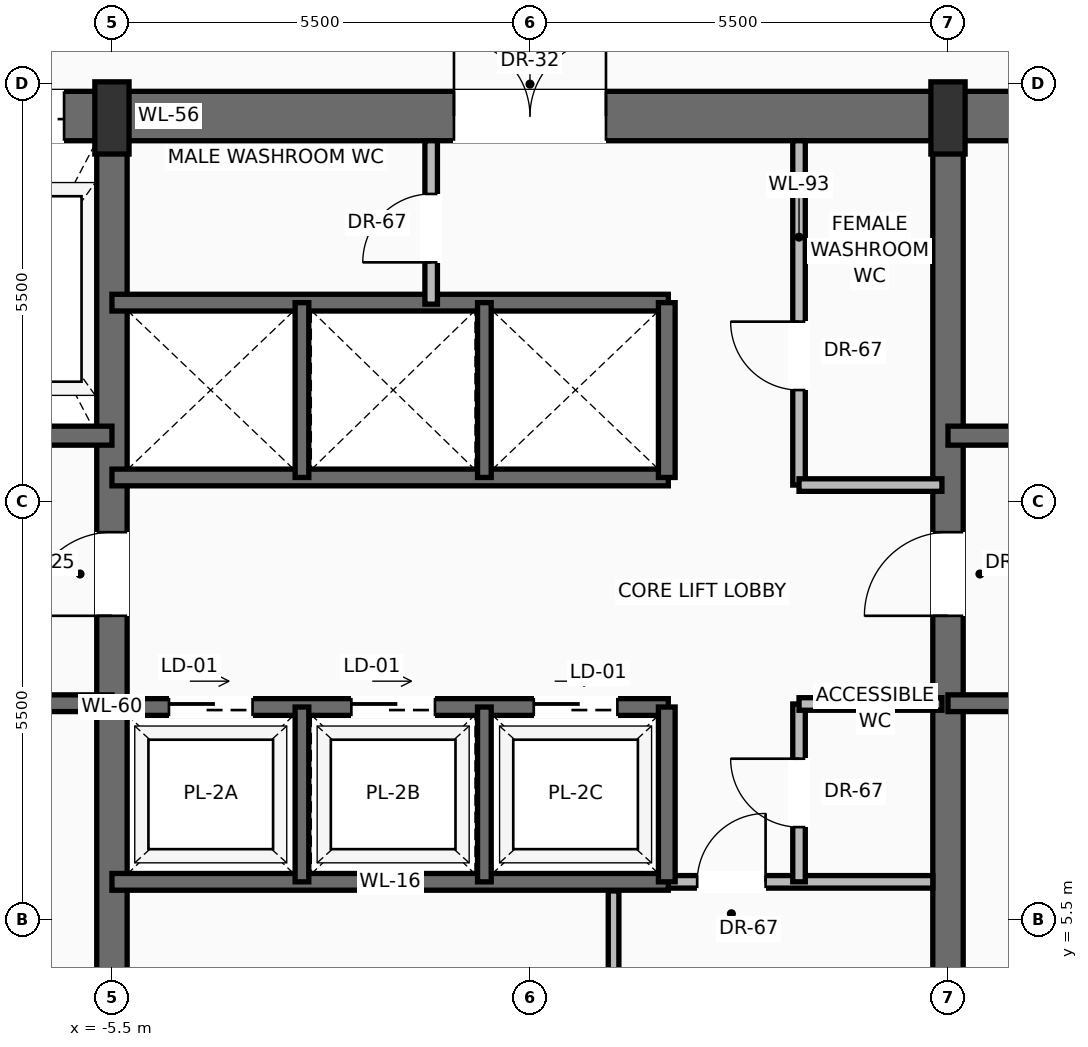
"""IFC4 building model, lengths in metres.
Left out: names, types, materials, properties, quantities, classifications, styles, units other than length and angle.
Written with IfcOpenShell. Run it as: python <this file> out.ifc"""

import sys

from ifc_helpers import new_model, si_unit, direction, frame, frame_2d, origin, origin_2d, place, context, subcontext, project, spatial, rectangle, extrude, source, transform, mapped, element, fill, save


model = new_model("IFC4")
c1 = context("Model", 3, precision=1e-05, world=origin(), true_north=direction((0.0, 1.0)))
c2 = subcontext(c1, "Body", "Model", "MODEL_VIEW")
j1 = project(units=[si_unit("LENGTHUNIT", "METRE"), si_unit("PLANEANGLEUNIT", "RADIAN")], contexts=[c1])
p1 = place(None, origin())
s1 = spatial("IfcSite", under=j1, at=p1, CompositionType="ELEMENT")
p2 = place(p1, origin())
s2 = spatial("IfcBuilding", under=s1, at=p2, CompositionType="ELEMENT")
p3 = place(p2, frame((0.0, 0.0, 193.2)))
s3 = spatial("IfcBuildingStorey", under=s2, at=p3, CompositionType="ELEMENT", Elevation=193.2)
p4 = place(p3, frame((-10.8, 16.075, 0.0), z_axis=(0.0, 0.0, 1.0), x_axis=(1.0, 0.0, 0.0)))
e1 = element("IfcWall", 1, at=p4, inside=s3, PredefinedType="SHEAR", context=c2, shape_type="SweptSolid", body=[
    extrude(rectangle(XDim=21.6, YDim=0.65, at=frame_2d((10.8, 0.0))), origin(), (0.0, 0.0, 1.0), 3.47),
])
p5 = place(p4, frame((3.37, 0.0, 0.0)))
e2 = element("IfcOpeningElement", 2, at=p5, cuts=e1, PredefinedType="OPENING", context=c2, shape_type="SweptSolid", body=[
    extrude(rectangle(XDim=1.3, YDim=2.3, at=frame_2d((0.65, 1.15))), frame((0.0, 0.335, 0.0), z_axis=(0.0, -1.0, 0.0), x_axis=(1.0, 0.0, 0.0)), (0.0, 0.0, 1.0), 0.67),
])
p6 = place(p4, frame((9.8, 0.0, 0.0)))
e3 = element("IfcOpeningElement", 3, at=p6, cuts=e1, PredefinedType="OPENING", context=c2, shape_type="SweptSolid", body=[
    extrude(rectangle(XDim=2.0, YDim=2.4, at=frame_2d((1.0, 1.2))), frame((0.0, 0.335, 0.0), z_axis=(0.0, -1.0, 0.0), x_axis=(1.0, 0.0, 0.0)), (0.0, 0.0, 1.0), 0.67),
])
p7 = place(p3, frame((-5.5, 0.525, 0.0), z_axis=(0.0, 0.0, 1.0), x_axis=(0.0, 1.0, 0.0)))
e4 = element("IfcWall", 4, at=p7, inside=s3, PredefinedType="SHEAR", context=c2, shape_type="SweptSolid", body=[
    extrude(rectangle(XDim=15.55, YDim=0.4, at=frame_2d((7.775, 0.0))), origin(), (0.0, 0.0, 1.0), 3.47),
])
p8 = place(p7, frame((8.975, 0.0, 0.0)))
e5 = element("IfcOpeningElement", 5, at=p8, cuts=e4, PredefinedType="OPENING", context=c2, shape_type="SweptSolid", body=[
    extrude(rectangle(XDim=1.1, YDim=2.2, at=frame_2d((0.55, 1.1))), frame((0.0, 0.21, 0.0), z_axis=(0.0, -1.0, 0.0), x_axis=(1.0, 0.0, 0.0)), (0.0, 0.0, 1.0), 0.42),
])
p9 = place(p3, frame((5.5, 0.525, 0.0), z_axis=(0.0, 0.0, 1.0), x_axis=(0.0, 1.0, 0.0)))
e6 = element("IfcWall", 6, at=p9, inside=s3, PredefinedType="SHEAR", context=c2, shape_type="SweptSolid", body=[
    extrude(rectangle(XDim=15.55, YDim=0.4, at=frame_2d((7.775, 0.0))), origin(), (0.0, 0.0, 1.0), 3.47),
])
p10 = place(p9, frame((8.975, 0.0, 0.0)))
e7 = element("IfcOpeningElement", 7, at=p10, cuts=e6, PredefinedType="OPENING", context=c2, shape_type="SweptSolid", body=[
    extrude(rectangle(XDim=1.1, YDim=2.2, at=frame_2d((0.55, 1.1))), frame((0.0, 0.21, 0.0), z_axis=(0.0, -1.0, 0.0), x_axis=(1.0, 0.0, 0.0)), (0.0, 0.0, 1.0), 0.42),
])
m1 = source(origin(), c2, "Body", "SweptSolid", [
    extrude(rectangle(XDim=0.45, YDim=0.95, at=origin_2d()), origin(), (0.0, 0.0, 1.0), 3.7),
])
for number, where, z_axis, x_axis in (
    (8, (-5.5, 16.05, 0.0), (0.0, 0.0, 1.0), (1.0, 0.0, 0.0)),
    (9, (5.5, 16.05, 0.0), (0.0, 0.0, 1.0), (1.0, 0.0, 0.0)),
):
    element("IfcColumn", number, at=place(p3, frame(where, z_axis=z_axis, x_axis=x_axis)), inside=s3, PredefinedType="PILASTER", context=c2, shape_type="MappedRepresentation", body=[
        mapped(m1, transform((0.0, 0.0, 0.0), scale=1.0)),
    ])
p11 = place(p3, frame((-5.5, 8.35, 0.0), z_axis=(0.0, 0.0, 1.0), x_axis=(-1.0, 0.0, 0.0)))
e10 = element("IfcWall", 10, at=p11, inside=s3, PredefinedType="SOLIDWALL", context=c2, shape_type="SweptSolid", body=[
    extrude(rectangle(XDim=4.65, YDim=0.22, at=frame_2d((2.325, 0.0))), origin(), (0.0, 0.0, 1.0), 3.47),
])
p12 = place(p11, frame((2.5, 0.0, 0.0)))
e11 = element("IfcOpeningElement", 11, at=p12, cuts=e10, PredefinedType="OPENING", context=c2, shape_type="SweptSolid", body=[
    extrude(rectangle(XDim=1.15, YDim=2.2, at=frame_2d((0.575, 1.1))), frame((0.0, 0.12, 0.0), z_axis=(0.0, -1.0, 0.0), x_axis=(1.0, 0.0, 0.0)), (0.0, 0.0, 1.0), 0.24),
])
p13 = place(p3, frame((-5.5, 11.87, 0.0), z_axis=(0.0, 0.0, 1.0), x_axis=(-1.0, 0.0, 0.0)))
e12 = element("IfcWall", 12, at=p13, inside=s3, PredefinedType="SOLIDWALL", context=c2, shape_type="SweptSolid", body=[
    extrude(rectangle(XDim=4.65, YDim=0.25, at=frame_2d((2.325, 0.0))), origin(), (0.0, 0.0, 1.0), 3.47),
])
p14 = place(p13, frame((2.95, 0.0, 0.0)))
e13 = element("IfcOpeningElement", 13, at=p14, cuts=e12, PredefinedType="OPENING", context=c2, shape_type="SweptSolid", body=[
    extrude(rectangle(XDim=1.2, YDim=2.25, at=frame_2d((0.6, 1.125))), frame((0.0, 0.135, 0.0), z_axis=(0.0, -1.0, 0.0), x_axis=(1.0, 0.0, 0.0)), (0.0, 0.0, 1.0), 0.27),
])
p15 = place(p3, frame((10.15, 8.35, 0.0), z_axis=(0.0, 0.0, 1.0), x_axis=(-1.0, 0.0, 0.0)))
e14 = element("IfcWall", 14, at=p15, inside=s3, PredefinedType="SOLIDWALL", context=c2, shape_type="SweptSolid", body=[
    extrude(rectangle(XDim=4.65, YDim=0.22, at=frame_2d((2.325, 0.0))), origin(), (0.0, 0.0, 1.0), 3.47),
])
p16 = place(p15, frame((1.0, 0.0, 0.0)))
e15 = element("IfcOpeningElement", 15, at=p16, cuts=e14, PredefinedType="OPENING", context=c2, shape_type="SweptSolid", body=[
    extrude(rectangle(XDim=1.15, YDim=2.2, at=frame_2d((0.575, 1.1))), frame((0.0, 0.12, 0.0), z_axis=(0.0, -1.0, 0.0), x_axis=(1.0, 0.0, 0.0)), (0.0, 0.0, 1.0), 0.24),
])
p17 = place(p3, frame((10.15, 11.87, 0.0), z_axis=(0.0, 0.0, 1.0), x_axis=(-1.0, 0.0, 0.0)))
e16 = element("IfcWall", 16, at=p17, inside=s3, PredefinedType="SOLIDWALL", context=c2, shape_type="SweptSolid", body=[
    extrude(rectangle(XDim=4.65, YDim=0.25, at=frame_2d((2.325, 0.0))), origin(), (0.0, 0.0, 1.0), 3.47),
])
p18 = place(p17, frame((0.5, 0.0, 0.0)))
e17 = element("IfcOpeningElement", 17, at=p18, cuts=e16, PredefinedType="OPENING", context=c2, shape_type="SweptSolid", body=[
    extrude(rectangle(XDim=1.2, YDim=2.25, at=frame_2d((0.6, 1.125))), frame((0.0, 0.135, 0.0), z_axis=(0.0, -1.0, 0.0), x_axis=(1.0, 0.0, 0.0)), (0.0, 0.0, 1.0), 0.27),
])
p19 = place(p3, frame((1.82, 6.0, 0.0), z_axis=(0.0, 0.0, 1.0), x_axis=(1.0, 0.0, 0.0)))
e18 = element("IfcWall", 18, at=p19, inside=s3, PredefinedType="PARTITIONING", context=c2, shape_type="SweptSolid", body=[
    extrude(rectangle(XDim=3.48, YDim=0.165, at=frame_2d((1.74, 0.0))), origin(), (0.0, 0.0, 1.0), 3.462),
])
p20 = place(p19, frame((0.38, 0.0, 0.0)))
e19 = element("IfcOpeningElement", 19, at=p20, cuts=e18, PredefinedType="OPENING", context=c2, shape_type="SweptSolid", body=[
    extrude(rectangle(XDim=0.9, YDim=2.1, at=frame_2d((0.45, 1.05))), frame((0.0, 0.093, 0.0), z_axis=(0.0, -1.0, 0.0), x_axis=(1.0, 0.0, 0.0)), (0.0, 0.0, 1.0), 0.185),
])
p21 = place(p3, frame((1.1, 0.85, 0.0), z_axis=(0.0, 0.0, 1.0), x_axis=(0.0, 1.0, 0.0)))
e20 = element("IfcWall", 20, at=p21, inside=s3, PredefinedType="PARTITIONING", context=c2, shape_type="SweptSolid", body=[
    extrude(rectangle(XDim=5.03, YDim=0.14, at=frame_2d((2.515, 0.0))), origin(), (0.0, 0.0, 1.0), 3.462),
])
p22 = place(p21, frame((2.1, 0.0, 0.0)))
e21 = element("IfcOpeningElement", 21, at=p22, cuts=e20, PredefinedType="OPENING", context=c2, shape_type="SweptSolid", body=[
    extrude(rectangle(XDim=0.9, YDim=2.1, at=frame_2d((0.45, 1.05))), frame((0.0, 0.08, 0.0), z_axis=(0.0, -1.0, 0.0), x_axis=(1.0, 0.0, 0.0)), (0.0, 0.0, 1.0), 0.16),
])
p23 = place(p3, frame((3.54, 6.0, 0.0), z_axis=(0.0, 0.0, 1.0), x_axis=(0.0, 1.0, 0.0)))
e22 = element("IfcWall", 22, at=p23, inside=s3, PredefinedType="PARTITIONING", context=c2, shape_type="SweptSolid", body=[
    extrude(rectangle(XDim=2.34, YDim=0.165, at=frame_2d((1.17, 0.0))), origin(), (0.0, 0.0, 1.0), 3.462),
])
p24 = place(p23, frame((0.72, 0.0, 0.0)))
e23 = element("IfcOpeningElement", 23, at=p24, cuts=e22, PredefinedType="OPENING", context=c2, shape_type="SweptSolid", body=[
    extrude(rectangle(XDim=0.9, YDim=2.1, at=frame_2d((0.45, 1.05))), frame((0.0, 0.093, 0.0), z_axis=(0.0, -1.0, 0.0), x_axis=(1.0, 0.0, 0.0)), (0.0, 0.0, 1.0), 0.185),
])
p25 = place(p3, frame((3.54, 8.34, 0.0), z_axis=(0.0, 0.0, 1.0), x_axis=(1.0, 0.0, 0.0)))
e24 = element("IfcWall", 24, at=p25, inside=s3, PredefinedType="PARTITIONING", context=c2, shape_type="SweptSolid", body=[
    extrude(rectangle(XDim=1.88, YDim=0.165, at=frame_2d((0.94, 0.0))), origin(), (0.0, 0.0, 1.0), 3.462),
])
p26 = place(p3, frame((-5.5, 6.0, 0.0), z_axis=(0.0, 0.0, 1.0), x_axis=(1.0, 0.0, 0.0)))
e25 = element("IfcWall", 25, at=p26, inside=s3, PredefinedType="SOLIDWALL", context=c2, shape_type="SweptSolid", body=[
    extrude(rectangle(XDim=7.32, YDim=0.22, at=frame_2d((3.66, 0.0))), origin(), (0.0, 0.0, 1.0), 3.47),
])
p27 = place(p3, frame((-5.5, 8.3, 0.0), z_axis=(0.0, 0.0, 1.0), x_axis=(1.0, 0.0, 0.0)))
e26 = element("IfcWall", 26, at=p27, inside=s3, PredefinedType="SOLIDWALL", context=c2, shape_type="SweptSolid", body=[
    extrude(rectangle(XDim=7.32, YDim=0.22, at=frame_2d((3.66, 0.0))), origin(), (0.0, 0.0, 1.0), 3.47),
])
p28 = place(p27, frame((0.75, 0.0, 0.0)))
e27 = element("IfcOpeningElement", 27, at=p28, cuts=e26, PredefinedType="OPENING", context=c2, shape_type="SweptSolid", body=[
    extrude(rectangle(XDim=1.1, YDim=2.2, at=frame_2d((0.55, 1.1))), frame((0.0, 0.12, 0.0), z_axis=(0.0, -1.0, 0.0), x_axis=(1.0, 0.0, 0.0)), (0.0, 0.0, 1.0), 0.24),
])
p29 = place(p27, frame((3.15, 0.0, 0.0)))
e28 = element("IfcOpeningElement", 28, at=p29, cuts=e26, PredefinedType="OPENING", context=c2, shape_type="SweptSolid", body=[
    extrude(rectangle(XDim=1.1, YDim=2.2, at=frame_2d((0.55, 1.1))), frame((0.0, 0.12, 0.0), z_axis=(0.0, -1.0, 0.0), x_axis=(1.0, 0.0, 0.0)), (0.0, 0.0, 1.0), 0.24),
])
p30 = place(p27, frame((5.55, 0.0, 0.0)))
e29 = element("IfcOpeningElement", 29, at=p30, cuts=e26, PredefinedType="OPENING", context=c2, shape_type="SweptSolid", body=[
    extrude(rectangle(XDim=1.1, YDim=2.2, at=frame_2d((0.55, 1.1))), frame((0.0, 0.12, 0.0), z_axis=(0.0, -1.0, 0.0), x_axis=(1.0, 0.0, 0.0)), (0.0, 0.0, 1.0), 0.24),
])
p31 = place(p3, frame((1.8, 6.0, 0.0), z_axis=(0.0, 0.0, 1.0), x_axis=(0.0, 1.0, 0.0)))
e30 = element("IfcWall", 30, at=p31, inside=s3, PredefinedType="SOLIDWALL", context=c2, shape_type="SweptSolid", body=[
    extrude(rectangle(XDim=2.3, YDim=0.22, at=frame_2d((1.15, 0.0))), origin(), (0.0, 0.0, 1.0), 3.47),
])
for number, where, z_axis, x_axis in (
    (31, (-3.0, 6.0, 0.0), (0.0, 0.0, 1.0), (0.0, 1.0, 0.0)),
    (32, (-0.6, 6.0, 0.0), (0.0, 0.0, 1.0), (0.0, 1.0, 0.0)),
):
    element("IfcWall", number, at=place(p3, frame(where, z_axis=z_axis, x_axis=x_axis)), inside=s3, PredefinedType="SOLIDWALL", context=c2, shape_type="SweptSolid", body=[
        extrude(rectangle(XDim=2.3, YDim=0.18, at=frame_2d((1.15, 0.0))), origin(), (0.0, 0.0, 1.0), 3.47),
    ])
for number, where, z_axis, x_axis in (
    (33, (-5.5, 11.32, 0.0), (0.0, 0.0, 1.0), (1.0, 0.0, 0.0)),
    (34, (-5.5, 13.62, 0.0), (0.0, 0.0, 1.0), (1.0, 0.0, 0.0)),
):
    element("IfcWall", number, at=place(p3, frame(where, z_axis=z_axis, x_axis=x_axis)), inside=s3, PredefinedType="SOLIDWALL", context=c2, shape_type="SweptSolid", body=[
        extrude(rectangle(XDim=7.32, YDim=0.22, at=frame_2d((3.66, 0.0))), origin(), (0.0, 0.0, 1.0), 3.47),
    ])
p32 = place(p3, frame((1.8, 11.32, 0.0), z_axis=(0.0, 0.0, 1.0), x_axis=(0.0, 1.0, 0.0)))
e35 = element("IfcWall", 35, at=p32, inside=s3, PredefinedType="SOLIDWALL", context=c2, shape_type="SweptSolid", body=[
    extrude(rectangle(XDim=2.3, YDim=0.22, at=frame_2d((1.15, 0.0))), origin(), (0.0, 0.0, 1.0), 3.47),
])
for number, where, z_axis, x_axis in (
    (36, (-3.0, 11.32, 0.0), (0.0, 0.0, 1.0), (0.0, 1.0, 0.0)),
    (37, (-0.6, 11.32, 0.0), (0.0, 0.0, 1.0), (0.0, 1.0, 0.0)),
):
    element("IfcWall", number, at=place(p3, frame(where, z_axis=z_axis, x_axis=x_axis)), inside=s3, PredefinedType="SOLIDWALL", context=c2, shape_type="SweptSolid", body=[
        extrude(rectangle(XDim=2.3, YDim=0.18, at=frame_2d((1.15, 0.0))), origin(), (0.0, 0.0, 1.0), 3.47),
    ])
p33 = place(p3, frame((-1.3, 13.6, 0.0), z_axis=(0.0, 0.0, 1.0), x_axis=(0.0, 1.0, 0.0)))
e38 = element("IfcWall", 38, at=p33, inside=s3, PredefinedType="PARTITIONING", context=c2, shape_type="SweptSolid", body=[
    extrude(rectangle(XDim=2.15, YDim=0.165, at=frame_2d((1.075, 0.0))), origin(), (0.0, 0.0, 1.0), 3.462),
])
p34 = place(p33, frame((0.55, 0.0, 0.0)))
e39 = element("IfcOpeningElement", 39, at=p34, cuts=e38, PredefinedType="OPENING", context=c2, shape_type="SweptSolid", body=[
    extrude(rectangle(XDim=0.9, YDim=2.1, at=frame_2d((0.45, 1.05))), frame((0.0, 0.093, 0.0), z_axis=(0.0, -1.0, 0.0), x_axis=(1.0, 0.0, 0.0)), (0.0, 0.0, 1.0), 0.185),
])
p35 = place(p3, frame((3.54, 11.22, 0.0), z_axis=(0.0, 0.0, 1.0), x_axis=(0.0, 1.0, 0.0)))
e40 = element("IfcWall", 40, at=p35, inside=s3, PredefinedType="PARTITIONING", context=c2, shape_type="SweptSolid", body=[
    extrude(rectangle(XDim=4.53, YDim=0.165, at=frame_2d((2.265, 0.0))), origin(), (0.0, 0.0, 1.0), 3.462),
])
p36 = place(p35, frame((1.25, 0.0, 0.0)))
e41 = element("IfcOpeningElement", 41, at=p36, cuts=e40, PredefinedType="OPENING", context=c2, shape_type="SweptSolid", body=[
    extrude(rectangle(XDim=0.9, YDim=2.1, at=frame_2d((0.45, 1.05))), frame((0.0, 0.093, 0.0), z_axis=(0.0, -1.0, 0.0), x_axis=(1.0, 0.0, 0.0)), (0.0, 0.0, 1.0), 0.185),
])
p37 = place(p3, frame((3.54, 11.22, 0.0), z_axis=(0.0, 0.0, 1.0), x_axis=(1.0, 0.0, 0.0)))
e42 = element("IfcWall", 42, at=p37, inside=s3, PredefinedType="PARTITIONING", context=c2, shape_type="SweptSolid", body=[
    extrude(rectangle(XDim=1.88, YDim=0.165, at=frame_2d((0.94, 0.0))), origin(), (0.0, 0.0, 1.0), 3.462),
])
m2 = source(origin(), c2, "Body", "SweptSolid", [
    extrude(rectangle(XDim=1.1, YDim=2.2, at=frame_2d((0.55, 1.1))), frame((0.0, 0.025, 0.0), z_axis=(0.0, -1.0, 0.0), x_axis=(1.0, 0.0, 0.0)), (0.0, 0.0, 1.0), 0.05),
])
p38 = place(p8, origin())
e43 = element("IfcDoor", 43, at=p38, inside=s3, OperationType="SINGLE_SWING_LEFT", PredefinedType="DOOR", context=c2, shape_type="MappedRepresentation", body=[
    mapped(m2, transform((0.0, 0.0, 0.0), scale=1.0)),
])
fill(e5, e43)
m3 = source(origin(), c2, "Body", "SweptSolid", [
    extrude(rectangle(XDim=1.3, YDim=2.3, at=frame_2d((0.65, 1.15))), frame((0.0, 0.025, 0.0), z_axis=(0.0, -1.0, 0.0), x_axis=(1.0, 0.0, 0.0)), (0.0, 0.0, 1.0), 0.05),
])
p39 = place(p5, origin())
e44 = element("IfcDoor", 44, at=p39, inside=s3, OperationType="SLIDING_TO_RIGHT", PredefinedType="DOOR", context=c2, shape_type="MappedRepresentation", body=[
    mapped(m3, transform((0.0, 0.0, 0.0), scale=1.0)),
])
fill(e2, e44)
p40 = place(p10, origin())
e45 = element("IfcDoor", 45, at=p40, inside=s3, OperationType="SINGLE_SWING_LEFT", PredefinedType="DOOR", context=c2, shape_type="MappedRepresentation", body=[
    mapped(m2, transform((0.0, 0.0, 0.0), scale=1.0)),
])
fill(e7, e45)
m4 = source(origin(), c2, "Body", "SweptSolid", [
    extrude(rectangle(XDim=2.0, YDim=2.4, at=frame_2d((1.0, 1.2))), frame((0.0, 0.025, 0.0), z_axis=(0.0, -1.0, 0.0), x_axis=(1.0, 0.0, 0.0)), (0.0, 0.0, 1.0), 0.05),
])
p41 = place(p6, origin())
e46 = element("IfcDoor", 46, at=p41, inside=s3, OperationType="DOUBLE_DOOR_SINGLE_SWING", PredefinedType="DOOR", context=c2, shape_type="MappedRepresentation", body=[
    mapped(m4, transform((0.0, 0.0, 0.0), scale=1.0)),
])
fill(e3, e46)
m5 = source(origin(), c2, "Body", "SweptSolid", [
    extrude(rectangle(XDim=0.9, YDim=2.1, at=frame_2d((0.45, 1.05))), frame((0.0, 0.025, 0.0), z_axis=(0.0, -1.0, 0.0), x_axis=(1.0, 0.0, 0.0)), (0.0, 0.0, 1.0), 0.05),
])
p42 = place(p20, origin())
e47 = element("IfcDoor", 47, at=p42, inside=s3, OperationType="SINGLE_SWING_RIGHT", PredefinedType="DOOR", context=c2, shape_type="MappedRepresentation", body=[
    mapped(m5, transform((0.0, 0.0, 0.0), scale=1.0)),
])
fill(e19, e47)
p43 = place(p24, origin())
e48 = element("IfcDoor", 48, at=p43, inside=s3, OperationType="SINGLE_SWING_RIGHT", PredefinedType="DOOR", context=c2, shape_type="MappedRepresentation", body=[
    mapped(m5, transform((0.0, 0.0, 0.0), scale=1.0)),
])
fill(e23, e48)
m6 = source(origin(), c2, "Body", "SweptSolid", [
    extrude(rectangle(XDim=1.1, YDim=2.2, at=frame_2d((0.55, 1.1))), frame((0.0, 0.025, 0.0), z_axis=(0.0, -1.0, 0.0), x_axis=(1.0, 0.0, 0.0)), (0.0, 0.0, 1.0), 0.05),
])
p44 = place(p28, origin())
e49 = element("IfcDoor", 49, at=p44, inside=s3, OperationType="SLIDING_TO_LEFT", PredefinedType="DOOR", context=c2, shape_type="MappedRepresentation", body=[
    mapped(m6, transform((0.0, 0.0, 0.0), scale=1.0)),
])
fill(e27, e49)
p45 = place(p29, origin())
e50 = element("IfcDoor", 50, at=p45, inside=s3, OperationType="SLIDING_TO_LEFT", PredefinedType="DOOR", context=c2, shape_type="MappedRepresentation", body=[
    mapped(m6, transform((0.0, 0.0, 0.0), scale=1.0)),
])
fill(e28, e50)
p46 = place(p30, origin())
e51 = element("IfcDoor", 51, at=p46, inside=s3, OperationType="SLIDING_TO_LEFT", PredefinedType="DOOR", context=c2, shape_type="MappedRepresentation", body=[
    mapped(m6, transform((0.0, 0.0, 0.0), scale=1.0)),
])
fill(e29, e51)
p47 = place(p34, origin())
e52 = element("IfcDoor", 52, at=p47, inside=s3, OperationType="SINGLE_SWING_LEFT", PredefinedType="DOOR", context=c2, shape_type="MappedRepresentation", body=[
    mapped(m5, transform((0.0, 0.0, 0.0), scale=1.0)),
])
fill(e39, e52)
p48 = place(p36, origin())
e53 = element("IfcDoor", 53, at=p48, inside=s3, OperationType="SINGLE_SWING_RIGHT", PredefinedType="DOOR", context=c2, shape_type="MappedRepresentation", body=[
    mapped(m5, transform((0.0, 0.0, 0.0), scale=1.0)),
])
fill(e41, e53)
save(model, sys.argv[1])
